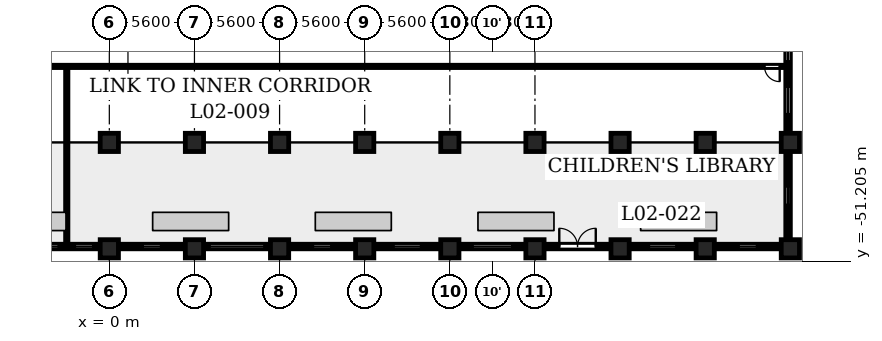
"""IFC4 building model, lengths in metres.
Left out: names, types, materials, properties, quantities, classifications, styles, units other than length and angle.
Written with IfcOpenShell. Run it as: python <this file> out.ifc"""

import sys

from ifc_helpers import new_model, si_unit, direction, frame, frame_2d, origin, origin_2d, place, context, subcontext, project, spatial, rectangle, circle, extrude, element, fill, save


model = new_model("IFC4")
c1 = context("Model", 3, precision=1e-05, world=origin(), true_north=direction((0.0, 1.0)))
c2 = subcontext(c1, "Body", "Model", "MODEL_VIEW")
j1 = project(units=[si_unit("LENGTHUNIT", "METRE"), si_unit("PLANEANGLEUNIT", "RADIAN")], contexts=[c1])
p1 = place(None, origin())
s1 = spatial("IfcSite", under=j1, at=p1, CompositionType="ELEMENT")
p2 = place(p1, origin())
s2 = spatial("IfcBuilding", under=s1, at=p2, CompositionType="ELEMENT")
p3 = place(p2, frame((0.0, 0.0, 11.3)))
s3 = spatial("IfcBuildingStorey", under=s2, at=p3, CompositionType="ELEMENT", Elevation=11.3)
for number, where, z_axis, x_axis in (
    (1, (0.0, -43.4, 0.0), (0.0, 0.0, 1.0), (1.0, 0.0, 0.0)),
    (2, (5.6, -43.4, 0.0), (0.0, 0.0, 1.0), (1.0, 0.0, 0.0)),
    (3, (11.2, -43.4, 0.0), (0.0, 0.0, 1.0), (1.0, 0.0, 0.0)),
    (4, (16.8, -43.4, 0.0), (0.0, 0.0, 1.0), (1.0, 0.0, 0.0)),
    (5, (22.4, -43.4, 0.0), (0.0, 0.0, 1.0), (1.0, 0.0, 0.0)),
    (6, (28.0, -43.4, 0.0), (0.0, 0.0, 1.0), (1.0, 0.0, 0.0)),
    (7, (33.6, -43.4, 0.0), (0.0, 0.0, 1.0), (1.0, 0.0, 0.0)),
    (8, (39.2, -43.4, 0.0), (0.0, 0.0, 1.0), (1.0, 0.0, 0.0)),
    (9, (44.8, -43.4, 0.0), (0.0, 0.0, 1.0), (1.0, 0.0, 0.0)),
    (10, (0.0, -50.4, 0.0), (0.0, 0.0, 1.0), (1.0, 0.0, 0.0)),
    (11, (5.6, -50.4, 0.0), (0.0, 0.0, 1.0), (1.0, 0.0, 0.0)),
    (12, (11.2, -50.4, 0.0), (0.0, 0.0, 1.0), (1.0, 0.0, 0.0)),
    (13, (16.8, -50.4, 0.0), (0.0, 0.0, 1.0), (1.0, 0.0, 0.0)),
    (14, (22.4, -50.4, 0.0), (0.0, 0.0, 1.0), (1.0, 0.0, 0.0)),
    (15, (28.0, -50.4, 0.0), (0.0, 0.0, 1.0), (1.0, 0.0, 0.0)),
    (16, (33.6, -50.4, 0.0), (0.0, 0.0, 1.0), (1.0, 0.0, 0.0)),
    (17, (39.2, -50.4, 0.0), (0.0, 0.0, 1.0), (1.0, 0.0, 0.0)),
    (18, (44.8, -50.4, 0.0), (0.0, 0.0, 1.0), (1.0, 0.0, 0.0)),
):
    element("IfcColumn", number, at=place(p3, frame(where, z_axis=z_axis, x_axis=x_axis)), inside=s3, PredefinedType="COLUMN", context=c2, shape_type="SweptSolid", body=[
        extrude(circle(Radius=0.6, at=origin_2d()), origin(), (0.0, 0.0, 1.0), 4.8),
    ])
p4 = place(p3, frame((44.65, -49.8, 0.0), z_axis=(0.0, 0.0, 1.0), x_axis=(0.0, 1.0, 0.0)))
e19 = element("IfcWall", 19, at=p4, inside=s3, PredefinedType="SOLIDWALL", context=c2, shape_type="SweptSolid", body=[
    extrude(rectangle(XDim=5.8, YDim=0.3, at=frame_2d((2.9, 0.0))), origin(), (0.0, 0.0, 1.0), 3.65),
])
p5 = place(p4, frame((2.3, 0.0, 0.6)))
e20 = element("IfcOpeningElement", 20, at=p5, cuts=e19, PredefinedType="OPENING", context=c2, shape_type="SweptSolid", body=[
    extrude(rectangle(XDim=1.2, YDim=1.55, at=frame_2d((0.6, 0.775))), frame((0.0, 0.16, 0.0), z_axis=(0.0, -1.0, 0.0), x_axis=(1.0, 0.0, 0.0)), (0.0, 0.0, 1.0), 0.32),
])
p6 = place(p3, frame((44.65, -42.8, 0.0), z_axis=(0.0, 0.0, 1.0), x_axis=(0.0, 1.0, 0.0)))
e21 = element("IfcWall", 21, at=p6, inside=s3, PredefinedType="SOLIDWALL", context=c2, shape_type="SweptSolid", body=[
    extrude(rectangle(XDim=5.8, YDim=0.3, at=frame_2d((2.9, 0.0))), origin(), (0.0, 0.0, 1.0), 3.65),
])
p7 = place(p6, frame((1.262, 0.0, 0.9)))
e22 = element("IfcOpeningElement", 22, at=p7, cuts=e21, PredefinedType="OPENING", context=c2, shape_type="SweptSolid", body=[
    extrude(rectangle(XDim=1.8, YDim=1.25, at=frame_2d((0.9, 0.625))), frame((0.0, 0.16, 0.0), z_axis=(0.0, -1.0, 0.0), x_axis=(1.0, 0.0, 0.0)), (0.0, 0.0, 1.0), 0.32),
])
p8 = place(p6, frame((4.738, 0.0, 0.6)))
e23 = element("IfcOpeningElement", 23, at=p8, cuts=e21, PredefinedType="OPENING", context=c2, shape_type="SweptSolid", body=[
    extrude(rectangle(XDim=0.8, YDim=1.55, at=frame_2d((0.4, 0.775))), frame((0.0, 0.16, 0.0), z_axis=(0.0, -1.0, 0.0), x_axis=(1.0, 0.0, 0.0)), (0.0, 0.0, 1.0), 0.32),
])
p9 = place(p3, frame((-5.0, -50.25, 0.0), z_axis=(0.0, 0.0, 1.0), x_axis=(1.0, 0.0, 0.0)))
e24 = element("IfcWall", 24, at=p9, inside=s3, PredefinedType="SOLIDWALL", context=c2, shape_type="SweptSolid", body=[
    extrude(rectangle(XDim=4.4, YDim=0.3, at=frame_2d((2.2, 0.0))), origin(), (0.0, 0.0, 1.0), 3.65),
])
p10 = place(p9, frame((0.462, 0.0, 0.6)))
e25 = element("IfcOpeningElement", 25, at=p10, cuts=e24, PredefinedType="OPENING", context=c2, shape_type="SweptSolid", body=[
    extrude(rectangle(XDim=1.2, YDim=1.55, at=frame_2d((0.6, 0.775))), frame((0.0, 0.16, 0.0), z_axis=(0.0, -1.0, 0.0), x_axis=(1.0, 0.0, 0.0)), (0.0, 0.0, 1.0), 0.32),
])
p11 = place(p9, frame((2.738, 0.0, 0.6)))
e26 = element("IfcOpeningElement", 26, at=p11, cuts=e24, PredefinedType="OPENING", context=c2, shape_type="SweptSolid", body=[
    extrude(rectangle(XDim=1.2, YDim=1.55, at=frame_2d((0.6, 0.775))), frame((0.0, 0.16, 0.0), z_axis=(0.0, -1.0, 0.0), x_axis=(1.0, 0.0, 0.0)), (0.0, 0.0, 1.0), 0.32),
])
p12 = place(p3, frame((0.6, -50.25, 0.0), z_axis=(0.0, 0.0, 1.0), x_axis=(1.0, 0.0, 0.0)))
e27 = element("IfcWall", 27, at=p12, inside=s3, PredefinedType="SOLIDWALL", context=c2, shape_type="SweptSolid", body=[
    extrude(rectangle(XDim=4.4, YDim=0.3, at=frame_2d((2.2, 0.0))), origin(), (0.0, 0.0, 1.0), 3.65),
])
p13 = place(p12, frame((1.6, 0.0, 0.6)))
e28 = element("IfcOpeningElement", 28, at=p13, cuts=e27, PredefinedType="OPENING", context=c2, shape_type="SweptSolid", body=[
    extrude(rectangle(XDim=1.2, YDim=1.55, at=frame_2d((0.6, 0.775))), frame((0.0, 0.16, 0.0), z_axis=(0.0, -1.0, 0.0), x_axis=(1.0, 0.0, 0.0)), (0.0, 0.0, 1.0), 0.32),
])
p14 = place(p3, frame((6.2, -50.25, 0.0), z_axis=(0.0, 0.0, 1.0), x_axis=(1.0, 0.0, 0.0)))
e29 = element("IfcWall", 29, at=p14, inside=s3, PredefinedType="SOLIDWALL", context=c2, shape_type="SweptSolid", body=[
    extrude(rectangle(XDim=4.4, YDim=0.3, at=frame_2d((2.2, 0.0))), origin(), (0.0, 0.0, 1.0), 3.65),
])
p15 = place(p14, frame((0.4, 0.0, 1.2)))
e30 = element("IfcOpeningElement", 30, at=p15, cuts=e29, PredefinedType="OPENING", context=c2, shape_type="SweptSolid", body=[
    extrude(rectangle(XDim=3.6, YDim=0.95, at=frame_2d((1.8, 0.475))), frame((0.0, 0.16, 0.0), z_axis=(0.0, -1.0, 0.0), x_axis=(1.0, 0.0, 0.0)), (0.0, 0.0, 1.0), 0.32),
])
p16 = place(p3, frame((11.8, -50.25, 0.0), z_axis=(0.0, 0.0, 1.0), x_axis=(1.0, 0.0, 0.0)))
e31 = element("IfcWall", 31, at=p16, inside=s3, PredefinedType="SOLIDWALL", context=c2, shape_type="SweptSolid", body=[
    extrude(rectangle(XDim=4.4, YDim=0.3, at=frame_2d((2.2, 0.0))), origin(), (0.0, 0.0, 1.0), 3.65),
])
p17 = place(p16, frame((1.6, 0.0, 0.6)))
e32 = element("IfcOpeningElement", 32, at=p17, cuts=e31, PredefinedType="OPENING", context=c2, shape_type="SweptSolid", body=[
    extrude(rectangle(XDim=1.2, YDim=1.55, at=frame_2d((0.6, 0.775))), frame((0.0, 0.16, 0.0), z_axis=(0.0, -1.0, 0.0), x_axis=(1.0, 0.0, 0.0)), (0.0, 0.0, 1.0), 0.32),
])
p18 = place(p3, frame((17.4, -50.25, 0.0), z_axis=(0.0, 0.0, 1.0), x_axis=(1.0, 0.0, 0.0)))
e33 = element("IfcWall", 33, at=p18, inside=s3, PredefinedType="SOLIDWALL", context=c2, shape_type="SweptSolid", body=[
    extrude(rectangle(XDim=4.4, YDim=0.3, at=frame_2d((2.2, 0.0))), origin(), (0.0, 0.0, 1.0), 3.65),
])
p19 = place(p18, frame((1.3, 0.0, 0.9)))
e34 = element("IfcOpeningElement", 34, at=p19, cuts=e33, PredefinedType="OPENING", context=c2, shape_type="SweptSolid", body=[
    extrude(rectangle(XDim=1.8, YDim=1.25, at=frame_2d((0.9, 0.625))), frame((0.0, 0.16, 0.0), z_axis=(0.0, -1.0, 0.0), x_axis=(1.0, 0.0, 0.0)), (0.0, 0.0, 1.0), 0.32),
])
p20 = place(p3, frame((23.0, -50.25, 0.0), z_axis=(0.0, 0.0, 1.0), x_axis=(1.0, 0.0, 0.0)))
e35 = element("IfcWall", 35, at=p20, inside=s3, PredefinedType="SOLIDWALL", context=c2, shape_type="SweptSolid", body=[
    extrude(rectangle(XDim=4.4, YDim=0.3, at=frame_2d((2.2, 0.0))), origin(), (0.0, 0.0, 1.0), 3.65),
])
p21 = place(p20, frame((0.9, 0.0, 0.9)))
e36 = element("IfcOpeningElement", 36, at=p21, cuts=e35, PredefinedType="OPENING", context=c2, shape_type="SweptSolid", body=[
    extrude(rectangle(XDim=2.6, YDim=1.25, at=frame_2d((1.3, 0.625))), frame((0.0, 0.16, 0.0), z_axis=(0.0, -1.0, 0.0), x_axis=(1.0, 0.0, 0.0)), (0.0, 0.0, 1.0), 0.32),
])
p22 = place(p3, frame((28.6, -50.25, 0.0), z_axis=(0.0, 0.0, 1.0), x_axis=(1.0, 0.0, 0.0)))
e37 = element("IfcWall", 37, at=p22, inside=s3, PredefinedType="SOLIDWALL", context=c2, shape_type="SweptSolid", body=[
    extrude(rectangle(XDim=4.4, YDim=0.3, at=frame_2d((2.2, 0.0))), origin(), (0.0, 0.0, 1.0), 3.65),
])
p23 = place(p22, frame((1.0, 0.0, 0.0)))
e38 = element("IfcOpeningElement", 38, at=p23, cuts=e37, PredefinedType="OPENING", context=c2, shape_type="SweptSolid", body=[
    extrude(rectangle(XDim=2.4, YDim=2.3, at=frame_2d((1.2, 1.15))), frame((0.0, 0.16, 0.0), z_axis=(0.0, -1.0, 0.0), x_axis=(1.0, 0.0, 0.0)), (0.0, 0.0, 1.0), 0.32),
])
p24 = place(p3, frame((34.2, -50.25, 0.0), z_axis=(0.0, 0.0, 1.0), x_axis=(1.0, 0.0, 0.0)))
e39 = element("IfcWall", 39, at=p24, inside=s3, PredefinedType="SOLIDWALL", context=c2, shape_type="SweptSolid", body=[
    extrude(rectangle(XDim=4.4, YDim=0.3, at=frame_2d((2.2, 0.0))), origin(), (0.0, 0.0, 1.0), 3.65),
])
p25 = place(p24, frame((1.3, 0.0, 0.9)))
e40 = element("IfcOpeningElement", 40, at=p25, cuts=e39, PredefinedType="OPENING", context=c2, shape_type="SweptSolid", body=[
    extrude(rectangle(XDim=1.8, YDim=1.25, at=frame_2d((0.9, 0.625))), frame((0.0, 0.16, 0.0), z_axis=(0.0, -1.0, 0.0), x_axis=(1.0, 0.0, 0.0)), (0.0, 0.0, 1.0), 0.32),
])
p26 = place(p3, frame((39.8, -50.25, 0.0), z_axis=(0.0, 0.0, 1.0), x_axis=(1.0, 0.0, 0.0)))
e41 = element("IfcWall", 41, at=p26, inside=s3, PredefinedType="SOLIDWALL", context=c2, shape_type="SweptSolid", body=[
    extrude(rectangle(XDim=4.4, YDim=0.3, at=frame_2d((2.2, 0.0))), origin(), (0.0, 0.0, 1.0), 3.65),
])
p27 = place(p26, frame((1.6, 0.0, 0.6)))
e42 = element("IfcOpeningElement", 42, at=p27, cuts=e41, PredefinedType="OPENING", context=c2, shape_type="SweptSolid", body=[
    extrude(rectangle(XDim=1.2, YDim=1.55, at=frame_2d((0.6, 0.775))), frame((0.0, 0.16, 0.0), z_axis=(0.0, -1.0, 0.0), x_axis=(1.0, 0.0, 0.0)), (0.0, 0.0, 1.0), 0.32),
])
p28 = place(p3, frame((-44.48, -38.4, 0.0), z_axis=(0.0, 0.0, 1.0), x_axis=(1.0, 0.0, 0.0)))
e43 = element("IfcWall", 43, at=p28, inside=s3, PredefinedType="PARTITIONING", context=c2, shape_type="SweptSolid", body=[
    extrude(rectangle(XDim=88.96, YDim=0.15, at=frame_2d((44.48, 0.0))), origin(), (0.0, 0.0, 1.0), 4.45),
])
p29 = place(p28, frame((0.42, 0.0, 0.0)))
e44 = element("IfcOpeningElement", 44, at=p29, cuts=e43, PredefinedType="OPENING", context=c2, shape_type="SweptSolid", body=[
    extrude(rectangle(XDim=1.0, YDim=2.1, at=frame_2d((0.5, 1.05))), frame((0.0, 0.085, 0.0), z_axis=(0.0, -1.0, 0.0), x_axis=(1.0, 0.0, 0.0)), (0.0, 0.0, 1.0), 0.17),
])
p30 = place(p28, frame((32.08, 0.0, 0.0)))
e45 = element("IfcOpeningElement", 45, at=p30, cuts=e43, PredefinedType="OPENING", context=c2, shape_type="SweptSolid", body=[
    extrude(rectangle(XDim=1.0, YDim=2.1, at=frame_2d((0.5, 1.05))), frame((0.0, 0.085, 0.0), z_axis=(0.0, -1.0, 0.0), x_axis=(1.0, 0.0, 0.0)), (0.0, 0.0, 1.0), 0.17),
])
p31 = place(p28, frame((34.33, 0.0, 0.0)))
e46 = element("IfcOpeningElement", 46, at=p31, cuts=e43, PredefinedType="OPENING", context=c2, shape_type="SweptSolid", body=[
    extrude(rectangle(XDim=0.9, YDim=2.1, at=frame_2d((0.45, 1.05))), frame((0.0, 0.085, 0.0), z_axis=(0.0, -1.0, 0.0), x_axis=(1.0, 0.0, 0.0)), (0.0, 0.0, 1.0), 0.17),
])
p32 = place(p28, frame((87.58, 0.0, 0.0)))
e47 = element("IfcOpeningElement", 47, at=p32, cuts=e43, PredefinedType="OPENING", context=c2, shape_type="SweptSolid", body=[
    extrude(rectangle(XDim=1.0, YDim=2.1, at=frame_2d((0.5, 1.05))), frame((0.0, 0.085, 0.0), z_axis=(0.0, -1.0, 0.0), x_axis=(1.0, 0.0, 0.0)), (0.0, 0.0, 1.0), 0.17),
])
p33 = place(p3, frame((-2.8, -50.08, 0.0), z_axis=(0.0, 0.0, 1.0), x_axis=(0.0, 1.0, 0.0)))
e48 = element("IfcWall", 48, at=p33, inside=s3, PredefinedType="PARTITIONING", context=c2, shape_type="SweptSolid", body=[
    extrude(rectangle(XDim=11.605, YDim=0.15, at=frame_2d((5.802, 0.0))), origin(), (0.0, 0.0, 1.0), 4.45),
])
p34 = place(p23, origin())
e49 = element("IfcDoor", 49, at=p34, inside=s3, OperationType="SINGLE_SWING_LEFT", PredefinedType="DOOR", context=c2, shape_type="SweptSolid", body=[
    extrude(rectangle(XDim=2.4, YDim=2.3, at=frame_2d((1.2, 1.15))), frame((0.0, 0.025, 0.0), z_axis=(0.0, -1.0, 0.0), x_axis=(1.0, 0.0, 0.0)), (0.0, 0.0, 1.0), 0.05),
])
fill(e38, e49)
p35 = place(p32, origin())
e50 = element("IfcDoor", 50, at=p35, inside=s3, OperationType="SINGLE_SWING_RIGHT", PredefinedType="DOOR", context=c2, shape_type="SweptSolid", body=[
    extrude(rectangle(XDim=1.0, YDim=2.1, at=frame_2d((0.5, 1.05))), frame((0.0, 0.025, 0.0), z_axis=(0.0, -1.0, 0.0), x_axis=(1.0, 0.0, 0.0)), (0.0, 0.0, 1.0), 0.05),
])
fill(e47, e50)
p36 = place(p5, origin())
e51 = element("IfcWindow", 51, at=p36, inside=s3, PartitioningType="SINGLE_PANEL", PredefinedType="WINDOW", context=c2, shape_type="SweptSolid", body=[
    extrude(rectangle(XDim=1.2, YDim=1.55, at=frame_2d((0.6, 0.775))), frame((0.0, 0.03, 0.0), z_axis=(0.0, -1.0, 0.0), x_axis=(1.0, 0.0, 0.0)), (0.0, 0.0, 1.0), 0.06),
])
fill(e20, e51)
p37 = place(p7, origin())
e52 = element("IfcWindow", 52, at=p37, inside=s3, PartitioningType="SINGLE_PANEL", PredefinedType="WINDOW", context=c2, shape_type="SweptSolid", body=[
    extrude(rectangle(XDim=1.8, YDim=1.25, at=frame_2d((0.9, 0.625))), frame((0.0, 0.03, 0.0), z_axis=(0.0, -1.0, 0.0), x_axis=(1.0, 0.0, 0.0)), (0.0, 0.0, 1.0), 0.06),
])
fill(e22, e52)
p38 = place(p8, origin())
e53 = element("IfcWindow", 53, at=p38, inside=s3, PartitioningType="SINGLE_PANEL", PredefinedType="WINDOW", context=c2, shape_type="SweptSolid", body=[
    extrude(rectangle(XDim=0.8, YDim=1.55, at=frame_2d((0.4, 0.775))), frame((0.0, 0.03, 0.0), z_axis=(0.0, -1.0, 0.0), x_axis=(1.0, 0.0, 0.0)), (0.0, 0.0, 1.0), 0.06),
])
fill(e23, e53)
p39 = place(p10, origin())
e54 = element("IfcWindow", 54, at=p39, inside=s3, PartitioningType="SINGLE_PANEL", PredefinedType="WINDOW", context=c2, shape_type="SweptSolid", body=[
    extrude(rectangle(XDim=1.2, YDim=1.55, at=frame_2d((0.6, 0.775))), frame((0.0, 0.03, 0.0), z_axis=(0.0, -1.0, 0.0), x_axis=(1.0, 0.0, 0.0)), (0.0, 0.0, 1.0), 0.06),
])
fill(e25, e54)
p40 = place(p11, origin())
e55 = element("IfcWindow", 55, at=p40, inside=s3, PartitioningType="SINGLE_PANEL", PredefinedType="WINDOW", context=c2, shape_type="SweptSolid", body=[
    extrude(rectangle(XDim=1.2, YDim=1.55, at=frame_2d((0.6, 0.775))), frame((0.0, 0.03, 0.0), z_axis=(0.0, -1.0, 0.0), x_axis=(1.0, 0.0, 0.0)), (0.0, 0.0, 1.0), 0.06),
])
fill(e26, e55)
p41 = place(p13, origin())
e56 = element("IfcWindow", 56, at=p41, inside=s3, PartitioningType="SINGLE_PANEL", PredefinedType="WINDOW", context=c2, shape_type="SweptSolid", body=[
    extrude(rectangle(XDim=1.2, YDim=1.55, at=frame_2d((0.6, 0.775))), frame((0.0, 0.03, 0.0), z_axis=(0.0, -1.0, 0.0), x_axis=(1.0, 0.0, 0.0)), (0.0, 0.0, 1.0), 0.06),
])
fill(e28, e56)
p42 = place(p15, origin())
e57 = element("IfcWindow", 57, at=p42, inside=s3, PartitioningType="SINGLE_PANEL", PredefinedType="WINDOW", context=c2, shape_type="SweptSolid", body=[
    extrude(rectangle(XDim=3.6, YDim=0.95, at=frame_2d((1.8, 0.475))), frame((0.0, 0.03, 0.0), z_axis=(0.0, -1.0, 0.0), x_axis=(1.0, 0.0, 0.0)), (0.0, 0.0, 1.0), 0.06),
])
fill(e30, e57)
p43 = place(p17, origin())
e58 = element("IfcWindow", 58, at=p43, inside=s3, PartitioningType="SINGLE_PANEL", PredefinedType="WINDOW", context=c2, shape_type="SweptSolid", body=[
    extrude(rectangle(XDim=1.2, YDim=1.55, at=frame_2d((0.6, 0.775))), frame((0.0, 0.03, 0.0), z_axis=(0.0, -1.0, 0.0), x_axis=(1.0, 0.0, 0.0)), (0.0, 0.0, 1.0), 0.06),
])
fill(e32, e58)
p44 = place(p19, origin())
e59 = element("IfcWindow", 59, at=p44, inside=s3, PartitioningType="SINGLE_PANEL", PredefinedType="WINDOW", context=c2, shape_type="SweptSolid", body=[
    extrude(rectangle(XDim=1.8, YDim=1.25, at=frame_2d((0.9, 0.625))), frame((0.0, 0.03, 0.0), z_axis=(0.0, -1.0, 0.0), x_axis=(1.0, 0.0, 0.0)), (0.0, 0.0, 1.0), 0.06),
])
fill(e34, e59)
p45 = place(p21, origin())
e60 = element("IfcWindow", 60, at=p45, inside=s3, PartitioningType="SINGLE_PANEL", PredefinedType="WINDOW", context=c2, shape_type="SweptSolid", body=[
    extrude(rectangle(XDim=2.6, YDim=1.25, at=frame_2d((1.3, 0.625))), frame((0.0, 0.03, 0.0), z_axis=(0.0, -1.0, 0.0), x_axis=(1.0, 0.0, 0.0)), (0.0, 0.0, 1.0), 0.06),
])
fill(e36, e60)
p46 = place(p25, origin())
e61 = element("IfcWindow", 61, at=p46, inside=s3, PartitioningType="SINGLE_PANEL", PredefinedType="WINDOW", context=c2, shape_type="SweptSolid", body=[
    extrude(rectangle(XDim=1.8, YDim=1.25, at=frame_2d((0.9, 0.625))), frame((0.0, 0.03, 0.0), z_axis=(0.0, -1.0, 0.0), x_axis=(1.0, 0.0, 0.0)), (0.0, 0.0, 1.0), 0.06),
])
fill(e40, e61)
p47 = place(p27, origin())
e62 = element("IfcWindow", 62, at=p47, inside=s3, PartitioningType="SINGLE_PANEL", PredefinedType="WINDOW", context=c2, shape_type="SweptSolid", body=[
    extrude(rectangle(XDim=1.2, YDim=1.55, at=frame_2d((0.6, 0.775))), frame((0.0, 0.03, 0.0), z_axis=(0.0, -1.0, 0.0), x_axis=(1.0, 0.0, 0.0)), (0.0, 0.0, 1.0), 0.06),
])
fill(e42, e62)
save(model, sys.argv[1])
